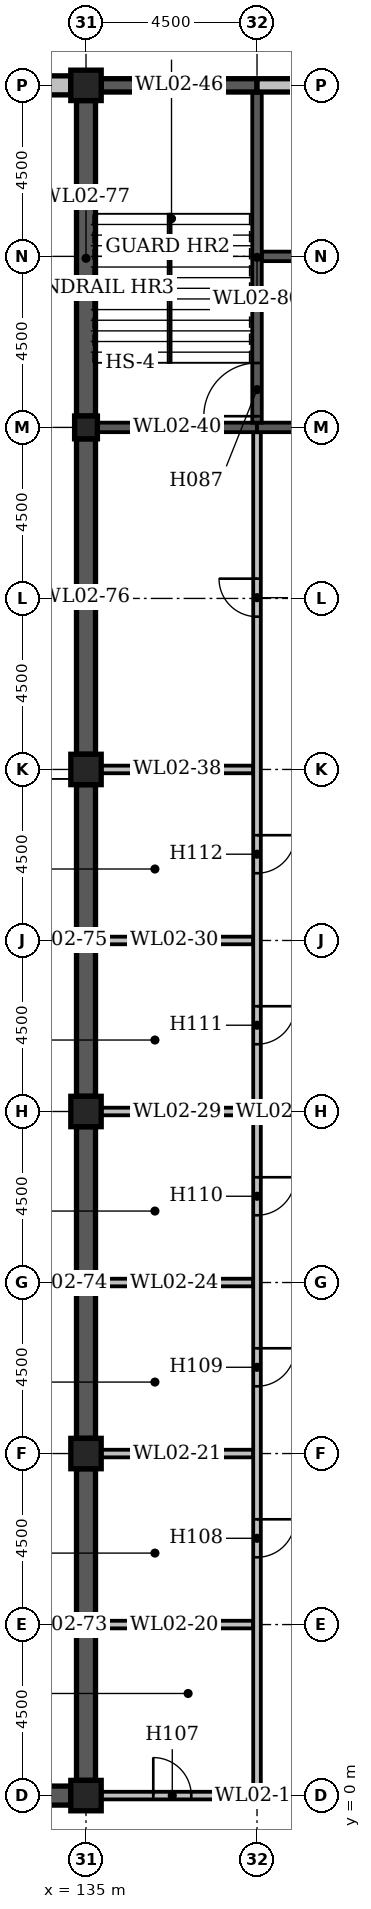
"""IFC4 building model, lengths in metres.
Left out: names, types, materials, properties, quantities, classifications, styles, units other than length and angle.
Written with IfcOpenShell. Run it as: python <this file> out.ifc"""

import sys

from ifc_helpers import new_model, si_unit, direction, frame, frame_2d, origin, origin_2d, place, context, subcontext, project, spatial, rectangle, extrude, element, fill, save


model = new_model("IFC4")
c1 = context("Model", 3, precision=1e-05, world=origin(), true_north=direction((0.0, 1.0)))
c2 = subcontext(c1, "Body", "Model", "MODEL_VIEW")
j1 = project(units=[si_unit("LENGTHUNIT", "METRE"), si_unit("PLANEANGLEUNIT", "RADIAN")], contexts=[c1])
p1 = place(None, origin())
s1 = spatial("IfcSite", under=j1, at=p1, CompositionType="ELEMENT")
p2 = place(p1, origin())
s2 = spatial("IfcBuilding", under=s1, at=p2, CompositionType="ELEMENT")
p3 = place(p2, frame((0.0, 0.0, 14.0)))
s3 = spatial("IfcBuildingStorey", under=s2, at=p3, CompositionType="ELEMENT", Elevation=14.0)
for number, where, z_axis, x_axis in (
    (1, (135.0, 0.0, -0.3), (0.0, 0.0, 1.0), (1.0, 0.0, 0.0)),
    (2, (135.0, 9.0, -0.3), (0.0, 0.0, 1.0), (1.0, 0.0, 0.0)),
    (3, (135.0, 18.0, -0.3), (0.0, 0.0, 1.0), (1.0, 0.0, 0.0)),
    (4, (135.0, 27.0, -0.3), (0.0, 0.0, 1.0), (1.0, 0.0, 0.0)),
):
    element("IfcColumn", number, at=place(p3, frame(where, z_axis=z_axis, x_axis=x_axis)), inside=s3, PredefinedType="COLUMN", context=c2, shape_type="SweptSolid", body=[
        extrude(rectangle(XDim=0.8, YDim=0.8, at=origin_2d()), origin(), (0.0, 0.0, 1.0), 5.0),
    ])
p4 = place(p3, frame((135.0, 36.0, -0.3), z_axis=(0.0, 0.0, 1.0), x_axis=(1.0, 0.0, 0.0)))
e5 = element("IfcColumn", 5, at=p4, inside=s3, PredefinedType="COLUMN", context=c2, shape_type="SweptSolid", body=[
    extrude(rectangle(XDim=0.6, YDim=0.6, at=origin_2d()), origin(), (0.0, 0.0, 1.0), 5.0),
])
p5 = place(p3, frame((135.0, 45.0, -0.3), z_axis=(0.0, 0.0, 1.0), x_axis=(1.0, 0.0, 0.0)))
e6 = element("IfcColumn", 6, at=p5, inside=s3, PredefinedType="COLUMN", context=c2, shape_type="SweptSolid", body=[
    extrude(rectangle(XDim=0.8, YDim=0.8, at=origin_2d()), origin(), (0.0, 0.0, 1.0), 5.0),
])
p6 = place(p3, frame((126.3, 0.0, 0.0), z_axis=(0.0, 0.0, 1.0), x_axis=(1.0, 0.0, 0.0)))
e7 = element("IfcWall", 7, at=p6, inside=s3, PredefinedType="STANDARD", context=c2, shape_type="SweptSolid", body=[
    extrude(rectangle(XDim=8.3, YDim=0.5, at=frame_2d((4.15, 0.0))), origin(), (0.0, 0.0, 1.0), 5.0),
])
p7 = place(p6, frame((1.82, 0.0, 0.0)))
e8 = element("IfcOpeningElement", 8, at=p7, cuts=e7, PredefinedType="OPENING", context=c2, shape_type="SweptSolid", body=[
    extrude(rectangle(XDim=1.8, YDim=2.4, at=frame_2d((0.9, 1.2))), frame((0.0, 0.262, 0.0), z_axis=(0.0, -1.0, 0.0), x_axis=(1.0, 0.0, 0.0)), (0.0, 0.0, 1.0), 0.524),
])
p8 = place(p3, frame((135.4, 0.0, 0.0), z_axis=(0.0, 0.0, 1.0), x_axis=(1.0, 0.0, 0.0)))
e9 = element("IfcWall", 9, at=p8, inside=s3, PredefinedType="STANDARD", context=c2, shape_type="SweptSolid", body=[
    extrude(rectangle(XDim=8.3, YDim=0.2, at=frame_2d((4.15, 0.0))), origin(), (0.0, 0.0, 1.0), 4.7),
])
p9 = place(p8, frame((5.77, 0.0, 0.0)))
e10 = element("IfcOpeningElement", 10, at=p9, cuts=e9, PredefinedType="OPENING", context=c2, shape_type="SweptSolid", body=[
    extrude(rectangle(XDim=1.2, YDim=2.1, at=frame_2d((0.6, 1.05))), frame((0.0, 0.112, 0.0), z_axis=(0.0, -1.0, 0.0), x_axis=(1.0, 0.0, 0.0)), (0.0, 0.0, 1.0), 0.224),
])
p10 = place(p8, frame((1.37, 0.0, 0.0)))
e11 = element("IfcOpeningElement", 11, at=p10, cuts=e9, PredefinedType="OPENING", context=c2, shape_type="SweptSolid", body=[
    extrude(rectangle(XDim=1.0, YDim=2.1, at=frame_2d((0.5, 1.05))), frame((0.0, 0.112, 0.0), z_axis=(0.0, -1.0, 0.0), x_axis=(1.0, 0.0, 0.0)), (0.0, 0.0, 1.0), 0.224),
])
p11 = place(p3, frame((135.25, 4.5, 0.0), z_axis=(0.0, 0.0, 1.0), x_axis=(1.0, 0.0, 0.0)))
e12 = element("IfcWall", 12, at=p11, inside=s3, PredefinedType="STANDARD", context=c2, shape_type="SweptSolid", body=[
    extrude(rectangle(XDim=4.15, YDim=0.2, at=frame_2d((2.075, 0.0))), origin(), (0.0, 0.0, 1.0), 4.7),
])
p12 = place(p3, frame((135.4, 9.0, 0.0), z_axis=(0.0, 0.0, 1.0), x_axis=(1.0, 0.0, 0.0)))
e13 = element("IfcWall", 13, at=p12, inside=s3, PredefinedType="STANDARD", context=c2, shape_type="SweptSolid", body=[
    extrude(rectangle(XDim=4.0, YDim=0.2, at=frame_2d((2.0, 0.0))), origin(), (0.0, 0.0, 1.0), 4.7),
])
p13 = place(p3, frame((135.25, 13.5, 0.0), z_axis=(0.0, 0.0, 1.0), x_axis=(1.0, 0.0, 0.0)))
e14 = element("IfcWall", 14, at=p13, inside=s3, PredefinedType="STANDARD", context=c2, shape_type="SweptSolid", body=[
    extrude(rectangle(XDim=4.15, YDim=0.2, at=frame_2d((2.075, 0.0))), origin(), (0.0, 0.0, 1.0), 4.7),
])
p14 = place(p3, frame((135.4, 18.0, 0.0), z_axis=(0.0, 0.0, 1.0), x_axis=(1.0, 0.0, 0.0)))
e15 = element("IfcWall", 15, at=p14, inside=s3, PredefinedType="STANDARD", context=c2, shape_type="SweptSolid", body=[
    extrude(rectangle(XDim=4.0, YDim=0.2, at=frame_2d((2.0, 0.0))), origin(), (0.0, 0.0, 1.0), 4.7),
])
p15 = place(p3, frame((135.25, 22.5, 0.0), z_axis=(0.0, 0.0, 1.0), x_axis=(1.0, 0.0, 0.0)))
e16 = element("IfcWall", 16, at=p15, inside=s3, PredefinedType="STANDARD", context=c2, shape_type="SweptSolid", body=[
    extrude(rectangle(XDim=4.15, YDim=0.2, at=frame_2d((2.075, 0.0))), origin(), (0.0, 0.0, 1.0), 4.7),
])
p16 = place(p3, frame((135.4, 27.0, 0.0), z_axis=(0.0, 0.0, 1.0), x_axis=(1.0, 0.0, 0.0)))
e17 = element("IfcWall", 17, at=p16, inside=s3, PredefinedType="STANDARD", context=c2, shape_type="SweptSolid", body=[
    extrude(rectangle(XDim=4.0, YDim=0.2, at=frame_2d((2.0, 0.0))), origin(), (0.0, 0.0, 1.0), 4.7),
])
p17 = place(p3, frame((135.3, 36.0, 0.0), z_axis=(0.0, 0.0, 1.0), x_axis=(1.0, 0.0, 0.0)))
e18 = element("IfcWall", 18, at=p17, inside=s3, PredefinedType="STANDARD", context=c2, shape_type="SweptSolid", body=[
    extrude(rectangle(XDim=4.2, YDim=0.25, at=frame_2d((2.1, 0.0))), origin(), (0.0, 0.0, 1.0), 5.0),
])
p18 = place(p3, frame((139.5, 36.0, 0.0), z_axis=(0.0, 0.0, 1.0), x_axis=(1.0, 0.0, 0.0)))
e19 = element("IfcWall", 19, at=p18, inside=s3, PredefinedType="STANDARD", context=c2, shape_type="SweptSolid", body=[
    extrude(rectangle(XDim=4.2, YDim=0.25, at=frame_2d((2.1, 0.0))), origin(), (0.0, 0.0, 1.0), 4.7),
])
p19 = place(p18, frame((1.57, 0.0, 0.0)))
e20 = element("IfcOpeningElement", 20, at=p19, cuts=e19, PredefinedType="OPENING", context=c2, shape_type="SweptSolid", body=[
    extrude(rectangle(XDim=1.4, YDim=2.1, at=frame_2d((0.7, 1.05))), frame((0.0, 0.137, 0.0), z_axis=(0.0, -1.0, 0.0), x_axis=(1.0, 0.0, 0.0)), (0.0, 0.0, 1.0), 0.274),
])
p20 = place(p3, frame((139.625, 40.5, 0.0), z_axis=(0.0, 0.0, 1.0), x_axis=(1.0, 0.0, 0.0)))
e21 = element("IfcWall", 21, at=p20, inside=s3, PredefinedType="STANDARD", context=c2, shape_type="SweptSolid", body=[
    extrude(rectangle(XDim=4.25, YDim=0.25, at=frame_2d((2.125, 0.0))), origin(), (0.0, 0.0, 1.0), 4.7),
])
p21 = place(p20, frame((1.42, 0.0, 0.0)))
e22 = element("IfcOpeningElement", 22, at=p21, cuts=e21, PredefinedType="OPENING", context=c2, shape_type="SweptSolid", body=[
    extrude(rectangle(XDim=1.4, YDim=2.1, at=frame_2d((0.7, 1.05))), frame((0.0, 0.137, 0.0), z_axis=(0.0, -1.0, 0.0), x_axis=(1.0, 0.0, 0.0)), (0.0, 0.0, 1.0), 0.274),
])
p22 = place(p3, frame((126.3, 45.0, 0.0), z_axis=(0.0, 0.0, 1.0), x_axis=(1.0, 0.0, 0.0)))
e23 = element("IfcWall", 23, at=p22, inside=s3, PredefinedType="STANDARD", context=c2, shape_type="SweptSolid", body=[
    extrude(rectangle(XDim=8.3, YDim=0.5, at=frame_2d((4.15, 0.0))), origin(), (0.0, 0.0, 1.0), 5.0),
])
p23 = place(p3, frame((135.4, 45.0, 0.0), z_axis=(0.0, 0.0, 1.0), x_axis=(1.0, 0.0, 0.0)))
e24 = element("IfcWall", 24, at=p23, inside=s3, PredefinedType="STANDARD", context=c2, shape_type="SweptSolid", body=[
    extrude(rectangle(XDim=4.1, YDim=0.35, at=frame_2d((2.05, 0.0))), origin(), (0.0, 0.0, 1.0), 5.0),
])
p24 = place(p3, frame((139.5, 45.0, 0.0), z_axis=(0.0, 0.0, 1.0), x_axis=(1.0, 0.0, 0.0)))
e25 = element("IfcWall", 25, at=p24, inside=s3, PredefinedType="STANDARD", context=c2, shape_type="SweptSolid", body=[
    extrude(rectangle(XDim=4.2, YDim=0.35, at=frame_2d((2.1, 0.0))), origin(), (0.0, 0.0, 1.0), 4.1),
])
for number, where, z_axis, x_axis in (
    (26, (135.0, 0.4, 0.0), (0.0, 0.0, 1.0), (0.0, 1.0, 0.0)),
    (27, (135.0, 9.4, 0.0), (0.0, 0.0, 1.0), (0.0, 1.0, 0.0)),
    (28, (135.0, 18.4, 0.0), (0.0, 0.0, 1.0), (0.0, 1.0, 0.0)),
):
    element("IfcWall", number, at=place(p3, frame(where, z_axis=z_axis, x_axis=x_axis)), inside=s3, PredefinedType="STANDARD", context=c2, shape_type="SweptSolid", body=[
        extrude(rectangle(XDim=8.2, YDim=0.5, at=frame_2d((4.1, 0.0))), origin(), (0.0, 0.0, 1.0), 5.0),
    ])
for number, where, z_axis, x_axis in (
    (29, (135.0, 27.4, 0.0), (0.0, 0.0, 1.0), (0.0, 1.0, 0.0)),
    (30, (135.0, 36.3, 0.0), (0.0, 0.0, 1.0), (0.0, 1.0, 0.0)),
):
    element("IfcWall", number, at=place(p3, frame(where, z_axis=z_axis, x_axis=x_axis)), inside=s3, PredefinedType="STANDARD", context=c2, shape_type="SweptSolid", body=[
        extrude(rectangle(XDim=8.3, YDim=0.5, at=frame_2d((4.15, 0.0))), origin(), (0.0, 0.0, 1.0), 5.0),
    ])
p25 = place(p3, frame((139.5, 0.1, 0.0), z_axis=(0.0, 0.0, 1.0), x_axis=(0.0, 1.0, 0.0)))
e31 = element("IfcWall", 31, at=p25, inside=s3, PredefinedType="STANDARD", context=c2, shape_type="SweptSolid", body=[
    extrude(rectangle(XDim=35.775, YDim=0.2, at=frame_2d((17.887, 0.0))), origin(), (0.0, 0.0, 1.0), 4.7),
])
p26 = place(p25, frame((6.17, 0.0, 0.0)))
e32 = element("IfcOpeningElement", 32, at=p26, cuts=e31, PredefinedType="OPENING", context=c2, shape_type="SweptSolid", body=[
    extrude(rectangle(XDim=1.0, YDim=2.1, at=frame_2d((0.5, 1.05))), frame((0.0, 0.112, 0.0), z_axis=(0.0, -1.0, 0.0), x_axis=(1.0, 0.0, 0.0)), (0.0, 0.0, 1.0), 0.224),
])
p27 = place(p25, frame((10.67, 0.0, 0.0)))
e33 = element("IfcOpeningElement", 33, at=p27, cuts=e31, PredefinedType="OPENING", context=c2, shape_type="SweptSolid", body=[
    extrude(rectangle(XDim=1.0, YDim=2.1, at=frame_2d((0.5, 1.05))), frame((0.0, 0.112, 0.0), z_axis=(0.0, -1.0, 0.0), x_axis=(1.0, 0.0, 0.0)), (0.0, 0.0, 1.0), 0.224),
])
p28 = place(p25, frame((15.17, 0.0, 0.0)))
e34 = element("IfcOpeningElement", 34, at=p28, cuts=e31, PredefinedType="OPENING", context=c2, shape_type="SweptSolid", body=[
    extrude(rectangle(XDim=1.0, YDim=2.1, at=frame_2d((0.5, 1.05))), frame((0.0, 0.112, 0.0), z_axis=(0.0, -1.0, 0.0), x_axis=(1.0, 0.0, 0.0)), (0.0, 0.0, 1.0), 0.224),
])
p29 = place(p25, frame((19.67, 0.0, 0.0)))
e35 = element("IfcOpeningElement", 35, at=p29, cuts=e31, PredefinedType="OPENING", context=c2, shape_type="SweptSolid", body=[
    extrude(rectangle(XDim=1.0, YDim=2.1, at=frame_2d((0.5, 1.05))), frame((0.0, 0.112, 0.0), z_axis=(0.0, -1.0, 0.0), x_axis=(1.0, 0.0, 0.0)), (0.0, 0.0, 1.0), 0.224),
])
p30 = place(p25, frame((24.17, 0.0, 0.0)))
e36 = element("IfcOpeningElement", 36, at=p30, cuts=e31, PredefinedType="OPENING", context=c2, shape_type="SweptSolid", body=[
    extrude(rectangle(XDim=1.0, YDim=2.1, at=frame_2d((0.5, 1.05))), frame((0.0, 0.112, 0.0), z_axis=(0.0, -1.0, 0.0), x_axis=(1.0, 0.0, 0.0)), (0.0, 0.0, 1.0), 0.224),
])
p31 = place(p25, frame((30.92, 0.0, 0.0)))
e37 = element("IfcOpeningElement", 37, at=p31, cuts=e31, PredefinedType="OPENING", context=c2, shape_type="SweptSolid", body=[
    extrude(rectangle(XDim=1.0, YDim=2.1, at=frame_2d((0.5, 1.05))), frame((0.0, 0.112, 0.0), z_axis=(0.0, -1.0, 0.0), x_axis=(1.0, 0.0, 0.0)), (0.0, 0.0, 1.0), 0.224),
])
p32 = place(p3, frame((139.5, 36.125, 0.0), z_axis=(0.0, 0.0, 1.0), x_axis=(0.0, 1.0, 0.0)))
e38 = element("IfcWall", 38, at=p32, inside=s3, PredefinedType="STANDARD", context=c2, shape_type="SweptSolid", body=[
    extrude(rectangle(XDim=8.7, YDim=0.25, at=frame_2d((4.35, 0.0))), origin(), (0.0, 0.0, 1.0), 5.0),
])
p33 = place(p32, frame((0.17, 0.0, 0.0)))
e39 = element("IfcOpeningElement", 39, at=p33, cuts=e38, PredefinedType="OPENING", context=c2, shape_type="SweptSolid", body=[
    extrude(rectangle(XDim=1.4, YDim=2.1, at=frame_2d((0.7, 1.05))), frame((0.0, 0.137, 0.0), z_axis=(0.0, -1.0, 0.0), x_axis=(1.0, 0.0, 0.0)), (0.0, 0.0, 1.0), 0.274),
])
p34 = place(p33, origin())
e40 = element("IfcDoor", 40, at=p34, inside=s3, OperationType="DOUBLE_DOOR_SINGLE_SWING", PredefinedType="DOOR", context=c2, shape_type="SweptSolid", body=[
    extrude(rectangle(XDim=1.4, YDim=2.1, at=frame_2d((0.7, 1.05))), frame((0.0, 0.025, 0.0), z_axis=(0.0, -1.0, 0.0), x_axis=(1.0, 0.0, 0.0)), (0.0, 0.0, 1.0), 0.05),
])
fill(e39, e40)
p35 = place(p10, origin())
e41 = element("IfcDoor", 41, at=p35, inside=s3, OperationType="SINGLE_SWING_LEFT", PredefinedType="DOOR", context=c2, shape_type="SweptSolid", body=[
    extrude(rectangle(XDim=1.0, YDim=2.1, at=frame_2d((0.5, 1.05))), frame((0.0, 0.025, 0.0), z_axis=(0.0, -1.0, 0.0), x_axis=(1.0, 0.0, 0.0)), (0.0, 0.0, 1.0), 0.05),
])
fill(e11, e41)
p36 = place(p26, origin())
e42 = element("IfcDoor", 42, at=p36, inside=s3, OperationType="SINGLE_SWING_RIGHT", PredefinedType="DOOR", context=c2, shape_type="SweptSolid", body=[
    extrude(rectangle(XDim=1.0, YDim=2.1, at=frame_2d((0.5, 1.05))), frame((0.0, 0.025, 0.0), z_axis=(0.0, -1.0, 0.0), x_axis=(1.0, 0.0, 0.0)), (0.0, 0.0, 1.0), 0.05),
])
fill(e32, e42)
p37 = place(p27, origin())
e43 = element("IfcDoor", 43, at=p37, inside=s3, OperationType="SINGLE_SWING_RIGHT", PredefinedType="DOOR", context=c2, shape_type="SweptSolid", body=[
    extrude(rectangle(XDim=1.0, YDim=2.1, at=frame_2d((0.5, 1.05))), frame((0.0, 0.025, 0.0), z_axis=(0.0, -1.0, 0.0), x_axis=(1.0, 0.0, 0.0)), (0.0, 0.0, 1.0), 0.05),
])
fill(e33, e43)
p38 = place(p28, origin())
e44 = element("IfcDoor", 44, at=p38, inside=s3, OperationType="SINGLE_SWING_RIGHT", PredefinedType="DOOR", context=c2, shape_type="SweptSolid", body=[
    extrude(rectangle(XDim=1.0, YDim=2.1, at=frame_2d((0.5, 1.05))), frame((0.0, 0.025, 0.0), z_axis=(0.0, -1.0, 0.0), x_axis=(1.0, 0.0, 0.0)), (0.0, 0.0, 1.0), 0.05),
])
fill(e34, e44)
p39 = place(p29, origin())
e45 = element("IfcDoor", 45, at=p39, inside=s3, OperationType="SINGLE_SWING_RIGHT", PredefinedType="DOOR", context=c2, shape_type="SweptSolid", body=[
    extrude(rectangle(XDim=1.0, YDim=2.1, at=frame_2d((0.5, 1.05))), frame((0.0, 0.025, 0.0), z_axis=(0.0, -1.0, 0.0), x_axis=(1.0, 0.0, 0.0)), (0.0, 0.0, 1.0), 0.05),
])
fill(e35, e45)
p40 = place(p30, origin())
e46 = element("IfcDoor", 46, at=p40, inside=s3, OperationType="SINGLE_SWING_RIGHT", PredefinedType="DOOR", context=c2, shape_type="SweptSolid", body=[
    extrude(rectangle(XDim=1.0, YDim=2.1, at=frame_2d((0.5, 1.05))), frame((0.0, 0.025, 0.0), z_axis=(0.0, -1.0, 0.0), x_axis=(1.0, 0.0, 0.0)), (0.0, 0.0, 1.0), 0.05),
])
fill(e36, e46)
p41 = place(p31, frame((1.0, 0.0, 0.0), z_axis=(0.0, 0.0, 1.0), x_axis=(-1.0, 0.0, 0.0)))
e47 = element("IfcDoor", 47, at=p41, inside=s3, OperationType="SINGLE_SWING_LEFT", PredefinedType="DOOR", context=c2, shape_type="SweptSolid", body=[
    extrude(rectangle(XDim=1.0, YDim=2.1, at=frame_2d((0.5, 1.05))), frame((0.0, 0.025, 0.0), z_axis=(0.0, -1.0, 0.0), x_axis=(1.0, 0.0, 0.0)), (0.0, 0.0, 1.0), 0.05),
])
fill(e37, e47)
save(model, sys.argv[1])
